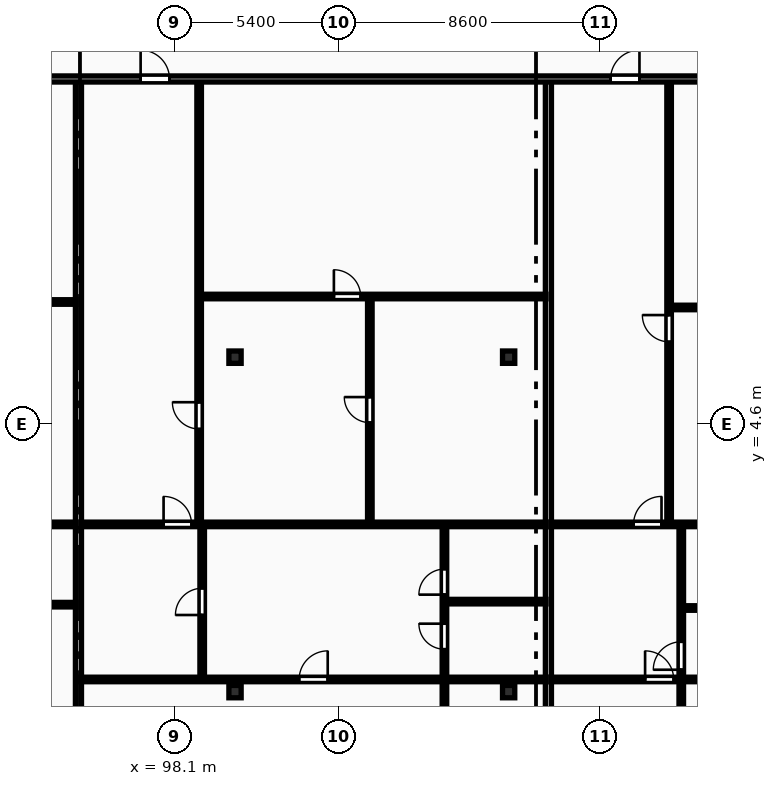
"""IFC4 building model, lengths in metres.
Left out: names, types, materials, properties, quantities, classifications, styles, units other than length and angle.
Written with IfcOpenShell. Run it as: python <this file> out.ifc"""

import sys

from ifc_helpers import new_model, si_unit, direction, frame, frame_2d, origin, origin_2d, place, context, subcontext, project, spatial, rectangle, i_section, extrude, element, fill, save


model = new_model("IFC4")
c1 = context("Model", 3, precision=1e-05, world=origin(), true_north=direction((0.0, 1.0)))
c2 = subcontext(c1, "Body", "Model", "MODEL_VIEW")
j1 = project(units=[si_unit("LENGTHUNIT", "METRE"), si_unit("PLANEANGLEUNIT", "RADIAN")], contexts=[c1])
p1 = place(None, origin())
s1 = spatial("IfcSite", under=j1, at=p1, CompositionType="ELEMENT")
p2 = place(p1, origin())
s2 = spatial("IfcBuilding", under=s1, at=p2, CompositionType="ELEMENT")
p3 = place(p2, frame((0.0, 0.0, 146.5)))
s3 = spatial("IfcBuildingStorey", under=s2, at=p3, CompositionType="ELEMENT", Elevation=146.5)
for number, where, z_axis, x_axis in (
    (1, (100.1, -4.2, 0.0), (0.0, 0.0, 1.0), (1.0, 0.0, 0.0)),
    (2, (100.1, 6.8, 0.0), (0.0, 0.0, 1.0), (1.0, 0.0, 0.0)),
    (3, (109.1, -4.2, 0.0), (0.0, 0.0, 1.0), (1.0, 0.0, 0.0)),
    (4, (109.1, 6.8, 0.0), (0.0, 0.0, 1.0), (1.0, 0.0, 0.0)),
):
    element("IfcColumn", number, at=place(p3, frame(where, z_axis=z_axis, x_axis=x_axis)), inside=s3, PredefinedType="COLUMN", context=c2, shape_type="SweptSolid", body=[
        extrude(i_section(OverallWidth=0.403, OverallDepth=0.406, WebThickness=0.027, FlangeThickness=0.043, FilletRadius=0.015, at=origin_2d()), origin(), (0.0, 0.0, 1.0), 3.6),
    ])
p4 = place(p3, frame((94.95, -8.7, 0.0), z_axis=(0.0, 0.0, 1.0), x_axis=(0.0, 1.0, 0.0)))
e5 = element("IfcWall", 5, at=p4, inside=s3, PredefinedType="PARTITIONING", context=c2, shape_type="SweptSolid", body=[
    extrude(rectangle(XDim=24.57, YDim=0.2, at=frame_2d((12.285, 0.0))), origin(), (0.0, 0.0, 1.0), 3.31),
])
p5 = place(p3, frame((76.73, 8.615, 0.0), z_axis=(0.0, 0.0, 1.0), x_axis=(1.0, 0.0, 0.0)))
e6 = element("IfcWall", 6, at=p5, inside=s3, PredefinedType="PARTITIONING", context=c2, shape_type="SweptSolid", body=[
    extrude(rectangle(XDim=18.14, YDim=0.15, at=frame_2d((9.07, 0.0))), origin(), (0.0, 0.0, 1.0), 3.31),
])
p6 = place(p5, frame((8.07, 0.0, 0.0)))
e7 = element("IfcOpeningElement", 7, at=p6, cuts=e6, PredefinedType="OPENING", context=c2, shape_type="SweptSolid", body=[
    extrude(rectangle(XDim=0.88, YDim=2.06, at=frame_2d((0.44, 1.03))), frame((0.0, 0.085, 0.0), z_axis=(0.0, -1.0, 0.0), x_axis=(1.0, 0.0, 0.0)), (0.0, 0.0, 1.0), 0.17),
])
p7 = place(p3, frame((77.53, -1.34, 0.0), z_axis=(0.0, 0.0, 1.0), x_axis=(1.0, 0.0, 0.0)))
e8 = element("IfcWall", 8, at=p7, inside=s3, PredefinedType="PARTITIONING", context=c2, shape_type="SweptSolid", body=[
    extrude(rectangle(XDim=17.34, YDim=0.15, at=frame_2d((8.67, 0.0))), origin(), (0.0, 0.0, 1.0), 3.31),
])
p8 = place(p7, frame((1.191, 0.0, 0.0)))
e9 = element("IfcOpeningElement", 9, at=p8, cuts=e8, PredefinedType="OPENING", context=c2, shape_type="SweptSolid", body=[
    extrude(rectangle(XDim=0.84, YDim=2.04, at=frame_2d((0.42, 1.02))), frame((0.0, 0.085, 0.0), z_axis=(0.0, -1.0, 0.0), x_axis=(1.0, 0.0, 0.0)), (0.0, 0.0, 1.0), 0.17),
])
p9 = place(p7, frame((8.25, 0.0, 0.0)))
e10 = element("IfcOpeningElement", 10, at=p9, cuts=e8, PredefinedType="OPENING", context=c2, shape_type="SweptSolid", body=[
    extrude(rectangle(XDim=0.84, YDim=2.04, at=frame_2d((0.42, 1.02))), frame((0.0, 0.085, 0.0), z_axis=(0.0, -1.0, 0.0), x_axis=(1.0, 0.0, 0.0)), (0.0, 0.0, 1.0), 0.17),
])
p10 = place(p7, frame((11.94, 0.0, 0.0)))
e11 = element("IfcOpeningElement", 11, at=p10, cuts=e8, PredefinedType="OPENING", context=c2, shape_type="SweptSolid", body=[
    extrude(rectangle(XDim=0.84, YDim=2.04, at=frame_2d((0.42, 1.02))), frame((0.0, 0.085, 0.0), z_axis=(0.0, -1.0, 0.0), x_axis=(1.0, 0.0, 0.0)), (0.0, 0.0, 1.0), 0.17),
])
p11 = place(p3, frame((72.78, 1.3, 0.0), z_axis=(0.0, 0.0, 1.0), x_axis=(1.0, 0.0, 0.0)))
e12 = element("IfcWall", 12, at=p11, inside=s3, PredefinedType="PARTITIONING", context=c2, shape_type="SweptSolid", body=[
    extrude(rectangle(XDim=22.09, YDim=0.15, at=frame_2d((11.045, 0.0))), origin(), (0.0, 0.0, 1.0), 3.31),
])
p12 = place(p11, frame((2.72, 0.0, 0.0)))
e13 = element("IfcOpeningElement", 13, at=p12, cuts=e12, PredefinedType="OPENING", context=c2, shape_type="SweptSolid", body=[
    extrude(rectangle(XDim=0.92, YDim=2.08, at=frame_2d((0.46, 1.04))), frame((0.0, 0.085, 0.0), z_axis=(0.0, -1.0, 0.0), x_axis=(1.0, 0.0, 0.0)), (0.0, 0.0, 1.0), 0.17),
])
p13 = place(p3, frame((110.408, -8.7, 0.0), z_axis=(0.0, 0.0, 1.0), x_axis=(0.0, 1.0, 0.0)))
e14 = element("IfcWall", 14, at=p13, inside=s3, PredefinedType="PARTITIONING", context=c2, shape_type="SweptSolid", body=[
    extrude(rectangle(XDim=24.57, YDim=0.2, at=frame_2d((12.285, 0.0))), origin(), (0.0, 0.0, 1.0), 3.31),
])
p14 = place(p3, frame((104.534, 1.34, 0.0), z_axis=(0.0, 0.0, 1.0), x_axis=(0.0, 1.0, 0.0)))
e15 = element("IfcWall", 15, at=p14, inside=s3, PredefinedType="PARTITIONING", context=c2, shape_type="SweptSolid", body=[
    extrude(rectangle(XDim=7.455, YDim=0.15, at=frame_2d((3.728, 0.0))), origin(), (0.0, 0.0, 1.0), 3.31),
])
p15 = place(p14, frame((3.308, 0.0, 0.0)))
e16 = element("IfcOpeningElement", 16, at=p15, cuts=e15, PredefinedType="OPENING", context=c2, shape_type="SweptSolid", body=[
    extrude(rectangle(XDim=0.84, YDim=2.04, at=frame_2d((0.42, 1.02))), frame((0.0, 0.085, 0.0), z_axis=(0.0, -1.0, 0.0), x_axis=(1.0, 0.0, 0.0)), (0.0, 0.0, 1.0), 0.17),
])
p16 = place(p3, frame((98.98, 8.795, 0.0), z_axis=(0.0, 0.0, 1.0), x_axis=(1.0, 0.0, 0.0)))
e17 = element("IfcWall", 17, at=p16, inside=s3, PredefinedType="PARTITIONING", context=c2, shape_type="SweptSolid", body=[
    extrude(rectangle(XDim=11.348, YDim=0.15, at=frame_2d((5.674, 0.0))), origin(), (0.0, 0.0, 1.0), 3.31),
])
p17 = place(p16, frame((4.372, 0.0, 0.0)))
e18 = element("IfcOpeningElement", 18, at=p17, cuts=e17, PredefinedType="OPENING", context=c2, shape_type="SweptSolid", body=[
    extrude(rectangle(XDim=0.88, YDim=2.06, at=frame_2d((0.44, 1.03))), frame((0.0, 0.085, 0.0), z_axis=(0.0, -1.0, 0.0), x_axis=(1.0, 0.0, 0.0)), (0.0, 0.0, 1.0), 0.17),
])
p18 = place(p3, frame((98.92, 1.34, 0.0), z_axis=(0.0, 0.0, 1.0), x_axis=(0.0, 1.0, 0.0)))
e19 = element("IfcWall", 19, at=p18, inside=s3, PredefinedType="PARTITIONING", context=c2, shape_type="SweptSolid", body=[
    extrude(rectangle(XDim=14.55, YDim=0.15, at=frame_2d((7.275, 0.0))), origin(), (0.0, 0.0, 1.0), 3.31),
])
p19 = place(p18, frame((3.098, 0.0, 0.0)))
e20 = element("IfcOpeningElement", 20, at=p19, cuts=e19, PredefinedType="OPENING", context=c2, shape_type="SweptSolid", body=[
    extrude(rectangle(XDim=0.88, YDim=2.06, at=frame_2d((0.44, 1.03))), frame((0.0, 0.085, 0.0), z_axis=(0.0, -1.0, 0.0), x_axis=(1.0, 0.0, 0.0)), (0.0, 0.0, 1.0), 0.17),
])
p20 = place(p3, frame((99.02, -3.74, 0.0), z_axis=(0.0, 0.0, 1.0), x_axis=(0.0, 1.0, 0.0)))
e21 = element("IfcWall", 21, at=p20, inside=s3, PredefinedType="PARTITIONING", context=c2, shape_type="SweptSolid", body=[
    extrude(rectangle(XDim=5.0, YDim=0.15, at=frame_2d((2.5, 0.0))), origin(), (0.0, 0.0, 1.0), 3.31),
])
p21 = place(p20, frame((2.06, 0.0, 0.0)))
e22 = element("IfcOpeningElement", 22, at=p21, cuts=e21, PredefinedType="OPENING", context=c2, shape_type="SweptSolid", body=[
    extrude(rectangle(XDim=0.88, YDim=2.06, at=frame_2d((0.44, 1.03))), frame((0.0, 0.085, 0.0), z_axis=(0.0, -1.0, 0.0), x_axis=(1.0, 0.0, 0.0)), (0.0, 0.0, 1.0), 0.17),
])
p22 = place(p3, frame((107.048, -1.24, 0.0), z_axis=(0.0, 0.0, 1.0), x_axis=(1.0, 0.0, 0.0)))
e23 = element("IfcWall", 23, at=p22, inside=s3, PredefinedType="PARTITIONING", context=c2, shape_type="SweptSolid", body=[
    extrude(rectangle(XDim=3.28, YDim=0.15, at=frame_2d((1.64, 0.0))), origin(), (0.0, 0.0, 1.0), 3.31),
])
p23 = place(p3, frame((106.988, -8.7, 0.0), z_axis=(0.0, 0.0, 1.0), x_axis=(0.0, 1.0, 0.0)))
e24 = element("IfcWall", 24, at=p23, inside=s3, PredefinedType="PARTITIONING", context=c2, shape_type="SweptSolid", body=[
    extrude(rectangle(XDim=9.96, YDim=0.15, at=frame_2d((4.98, 0.0))), origin(), (0.0, 0.0, 1.0), 3.31),
])
p24 = place(p23, frame((5.894, 0.0, 0.0)))
e25 = element("IfcOpeningElement", 25, at=p24, cuts=e24, PredefinedType="OPENING", context=c2, shape_type="SweptSolid", body=[
    extrude(rectangle(XDim=0.84, YDim=2.04, at=frame_2d((0.42, 1.02))), frame((0.0, 0.085, 0.0), z_axis=(0.0, -1.0, 0.0), x_axis=(1.0, 0.0, 0.0)), (0.0, 0.0, 1.0), 0.17),
])
p25 = place(p23, frame((7.69, 0.0, 0.0)))
e26 = element("IfcOpeningElement", 26, at=p25, cuts=e24, PredefinedType="OPENING", context=c2, shape_type="SweptSolid", body=[
    extrude(rectangle(XDim=0.84, YDim=2.04, at=frame_2d((0.42, 1.02))), frame((0.0, 0.085, 0.0), z_axis=(0.0, -1.0, 0.0), x_axis=(1.0, 0.0, 0.0)), (0.0, 0.0, 1.0), 0.17),
])
p26 = place(p23, frame((2.223, 0.0, 0.0)))
e27 = element("IfcOpeningElement", 27, at=p26, cuts=e24, PredefinedType="OPENING", context=c2, shape_type="SweptSolid", body=[
    extrude(rectangle(XDim=0.88, YDim=2.06, at=frame_2d((0.44, 1.03))), frame((0.0, 0.085, 0.0), z_axis=(0.0, -1.0, 0.0), x_axis=(1.0, 0.0, 0.0)), (0.0, 0.0, 1.0), 0.17),
])
p27 = place(p3, frame((95.03, 1.3, 0.0), z_axis=(0.0, 0.0, 1.0), x_axis=(1.0, 0.0, 0.0)))
e28 = element("IfcWall", 28, at=p27, inside=s3, PredefinedType="PARTITIONING", context=c2, shape_type="SweptSolid", body=[
    extrude(rectangle(XDim=15.298, YDim=0.15, at=frame_2d((7.649, 0.0))), origin(), (0.0, 0.0, 1.0), 3.31),
])
p28 = place(p27, frame((2.72, 0.0, 0.0)))
e29 = element("IfcOpeningElement", 29, at=p28, cuts=e28, PredefinedType="OPENING", context=c2, shape_type="SweptSolid", body=[
    extrude(rectangle(XDim=0.92, YDim=2.08, at=frame_2d((0.46, 1.04))), frame((0.0, 0.085, 0.0), z_axis=(0.0, -1.0, 0.0), x_axis=(1.0, 0.0, 0.0)), (0.0, 0.0, 1.0), 0.17),
])
p29 = place(p3, frame((95.03, -3.8, 0.0), z_axis=(0.0, 0.0, 1.0), x_axis=(1.0, 0.0, 0.0)))
e30 = element("IfcWall", 30, at=p29, inside=s3, PredefinedType="PARTITIONING", context=c2, shape_type="SweptSolid", body=[
    extrude(rectangle(XDim=15.298, YDim=0.15, at=frame_2d((7.649, 0.0))), origin(), (0.0, 0.0, 1.0), 3.31),
])
p30 = place(p29, frame((7.179, 0.0, 0.0)))
e31 = element("IfcOpeningElement", 31, at=p30, cuts=e30, PredefinedType="OPENING", context=c2, shape_type="SweptSolid", body=[
    extrude(rectangle(XDim=0.94, YDim=2.1, at=frame_2d((0.47, 1.05))), frame((0.0, 0.085, 0.0), z_axis=(0.0, -1.0, 0.0), x_axis=(1.0, 0.0, 0.0)), (0.0, 0.0, 1.0), 0.17),
])
p31 = place(p3, frame((114.438, 8.435, 0.0), z_axis=(0.0, 0.0, 1.0), x_axis=(1.0, 0.0, 0.0)))
e32 = element("IfcWall", 32, at=p31, inside=s3, PredefinedType="PARTITIONING", context=c2, shape_type="SweptSolid", body=[
    extrude(rectangle(XDim=16.182, YDim=0.15, at=frame_2d((8.091, 0.0))), origin(), (0.0, 0.0, 1.0), 3.31),
])
p32 = place(p31, frame((6.821, 0.0, 0.0)))
e33 = element("IfcOpeningElement", 33, at=p32, cuts=e32, PredefinedType="OPENING", context=c2, shape_type="SweptSolid", body=[
    extrude(rectangle(XDim=0.88, YDim=2.06, at=frame_2d((0.44, 1.03))), frame((0.0, 0.085, 0.0), z_axis=(0.0, -1.0, 0.0), x_axis=(1.0, 0.0, 0.0)), (0.0, 0.0, 1.0), 0.17),
])
p33 = place(p3, frame((114.378, 1.34, 0.0), z_axis=(0.0, 0.0, 1.0), x_axis=(0.0, 1.0, 0.0)))
e34 = element("IfcWall", 34, at=p33, inside=s3, PredefinedType="PARTITIONING", context=c2, shape_type="SweptSolid", body=[
    extrude(rectangle(XDim=14.55, YDim=0.15, at=frame_2d((7.275, 0.0))), origin(), (0.0, 0.0, 1.0), 3.31),
])
p34 = place(p33, frame((5.965, 0.0, 0.0)))
e35 = element("IfcOpeningElement", 35, at=p34, cuts=e34, PredefinedType="OPENING", context=c2, shape_type="SweptSolid", body=[
    extrude(rectangle(XDim=0.88, YDim=2.06, at=frame_2d((0.44, 1.03))), frame((0.0, 0.085, 0.0), z_axis=(0.0, -1.0, 0.0), x_axis=(1.0, 0.0, 0.0)), (0.0, 0.0, 1.0), 0.17),
])
p35 = place(p3, frame((114.778, -8.7, 0.0), z_axis=(0.0, 0.0, 1.0), x_axis=(0.0, 1.0, 0.0)))
e36 = element("IfcWall", 36, at=p35, inside=s3, PredefinedType="PARTITIONING", context=c2, shape_type="SweptSolid", body=[
    extrude(rectangle(XDim=9.96, YDim=0.15, at=frame_2d((4.98, 0.0))), origin(), (0.0, 0.0, 1.0), 3.31),
])
p36 = place(p35, frame((5.22, 0.0, 0.0)))
e37 = element("IfcOpeningElement", 37, at=p36, cuts=e36, PredefinedType="OPENING", context=c2, shape_type="SweptSolid", body=[
    extrude(rectangle(XDim=0.92, YDim=2.08, at=frame_2d((0.46, 1.04))), frame((0.0, 0.085, 0.0), z_axis=(0.0, -1.0, 0.0), x_axis=(1.0, 0.0, 0.0)), (0.0, 0.0, 1.0), 0.17),
])
p37 = place(p3, frame((114.818, -1.45, 0.0), z_axis=(0.0, 0.0, 1.0), x_axis=(1.0, 0.0, 0.0)))
e38 = element("IfcWall", 38, at=p37, inside=s3, PredefinedType="PARTITIONING", context=c2, shape_type="SweptSolid", body=[
    extrude(rectangle(XDim=15.802, YDim=0.15, at=frame_2d((7.901, 0.0))), origin(), (0.0, 0.0, 1.0), 3.31),
])
p38 = place(p37, frame((1.21, 0.0, 0.0)))
e39 = element("IfcOpeningElement", 39, at=p38, cuts=e38, PredefinedType="OPENING", context=c2, shape_type="SweptSolid", body=[
    extrude(rectangle(XDim=0.84, YDim=2.04, at=frame_2d((0.42, 1.02))), frame((0.0, 0.085, 0.0), z_axis=(0.0, -1.0, 0.0), x_axis=(1.0, 0.0, 0.0)), (0.0, 0.0, 1.0), 0.17),
])
p39 = place(p37, frame((7.481, 0.0, 0.0)))
e40 = element("IfcOpeningElement", 40, at=p39, cuts=e38, PredefinedType="OPENING", context=c2, shape_type="SweptSolid", body=[
    extrude(rectangle(XDim=0.84, YDim=2.04, at=frame_2d((0.42, 1.02))), frame((0.0, 0.085, 0.0), z_axis=(0.0, -1.0, 0.0), x_axis=(1.0, 0.0, 0.0)), (0.0, 0.0, 1.0), 0.17),
])
p40 = place(p37, frame((11.362, 0.0, 0.0)))
e41 = element("IfcOpeningElement", 41, at=p40, cuts=e38, PredefinedType="OPENING", context=c2, shape_type="SweptSolid", body=[
    extrude(rectangle(XDim=0.84, YDim=2.04, at=frame_2d((0.42, 1.02))), frame((0.0, 0.085, 0.0), z_axis=(0.0, -1.0, 0.0), x_axis=(1.0, 0.0, 0.0)), (0.0, 0.0, 1.0), 0.17),
])
p41 = place(p3, frame((110.488, 1.3, 0.0), z_axis=(0.0, 0.0, 1.0), x_axis=(1.0, 0.0, 0.0)))
e42 = element("IfcWall", 42, at=p41, inside=s3, PredefinedType="PARTITIONING", context=c2, shape_type="SweptSolid", body=[
    extrude(rectangle(XDim=20.132, YDim=0.15, at=frame_2d((10.066, 0.0))), origin(), (0.0, 0.0, 1.0), 3.31),
])
p42 = place(p41, frame((2.72, 0.0, 0.0)))
e43 = element("IfcOpeningElement", 43, at=p42, cuts=e42, PredefinedType="OPENING", context=c2, shape_type="SweptSolid", body=[
    extrude(rectangle(XDim=0.92, YDim=2.08, at=frame_2d((0.46, 1.04))), frame((0.0, 0.085, 0.0), z_axis=(0.0, -1.0, 0.0), x_axis=(1.0, 0.0, 0.0)), (0.0, 0.0, 1.0), 0.17),
])
p43 = place(p3, frame((110.488, -3.8, 0.0), z_axis=(0.0, 0.0, 1.0), x_axis=(1.0, 0.0, 0.0)))
e44 = element("IfcWall", 44, at=p43, inside=s3, PredefinedType="PARTITIONING", context=c2, shape_type="SweptSolid", body=[
    extrude(rectangle(XDim=15.442, YDim=0.15, at=frame_2d((7.721, 0.0))), origin(), (0.0, 0.0, 1.0), 3.31),
])
p44 = place(p43, frame((3.1, 0.0, 0.0)))
e45 = element("IfcOpeningElement", 45, at=p44, cuts=e44, PredefinedType="OPENING", context=c2, shape_type="SweptSolid", body=[
    extrude(rectangle(XDim=0.94, YDim=2.1, at=frame_2d((0.47, 1.05))), frame((0.0, 0.085, 0.0), z_axis=(0.0, -1.0, 0.0), x_axis=(1.0, 0.0, 0.0)), (0.0, 0.0, 1.0), 0.17),
])
p45 = place(p43, frame((5.311, 0.0, 0.0)))
e46 = element("IfcOpeningElement", 46, at=p45, cuts=e44, PredefinedType="OPENING", context=c2, shape_type="SweptSolid", body=[
    extrude(rectangle(XDim=0.88, YDim=2.06, at=frame_2d((0.44, 1.03))), frame((0.0, 0.085, 0.0), z_axis=(0.0, -1.0, 0.0), x_axis=(1.0, 0.0, 0.0)), (0.0, 0.0, 1.0), 0.17),
])
p46 = place(p43, frame((9.926, 0.0, 0.0)))
e47 = element("IfcOpeningElement", 47, at=p46, cuts=e44, PredefinedType="OPENING", context=c2, shape_type="SweptSolid", body=[
    extrude(rectangle(XDim=0.88, YDim=2.06, at=frame_2d((0.44, 1.03))), frame((0.0, 0.085, 0.0), z_axis=(0.0, -1.0, 0.0), x_axis=(1.0, 0.0, 0.0)), (0.0, 0.0, 1.0), 0.17),
])
p47 = place(p3, frame((72.7, 15.95, 0.0), z_axis=(0.0, 0.0, 1.0), x_axis=(1.0, 0.0, 0.0)))
e48 = element("IfcWall", 48, at=p47, inside=s3, PredefinedType="PARTITIONING", context=c2, shape_type="SweptSolid", body=[
    extrude(rectangle(XDim=58.0, YDim=0.2, at=frame_2d((29.0, 0.0))), origin(), (0.0, 0.0, 1.0), 3.31),
])
p48 = place(p47, frame((2.045, 0.0, 0.0)))
e49 = element("IfcOpeningElement", 49, at=p48, cuts=e48, PredefinedType="OPENING", context=c2, shape_type="SweptSolid", body=[
    extrude(rectangle(XDim=0.95, YDim=2.15, at=frame_2d((0.475, 1.075))), frame((0.0, 0.11, 0.0), z_axis=(0.0, -1.0, 0.0), x_axis=(1.0, 0.0, 0.0)), (0.0, 0.0, 1.0), 0.22),
])
p49 = place(p47, frame((24.295, 0.0, 0.0)))
e50 = element("IfcOpeningElement", 50, at=p49, cuts=e48, PredefinedType="OPENING", context=c2, shape_type="SweptSolid", body=[
    extrude(rectangle(XDim=0.95, YDim=2.15, at=frame_2d((0.475, 1.075))), frame((0.0, 0.11, 0.0), z_axis=(0.0, -1.0, 0.0), x_axis=(1.0, 0.0, 0.0)), (0.0, 0.0, 1.0), 0.22),
])
p50 = place(p47, frame((39.753, 0.0, 0.0)))
e51 = element("IfcOpeningElement", 51, at=p50, cuts=e48, PredefinedType="OPENING", context=c2, shape_type="SweptSolid", body=[
    extrude(rectangle(XDim=0.95, YDim=2.15, at=frame_2d((0.475, 1.075))), frame((0.0, 0.11, 0.0), z_axis=(0.0, -1.0, 0.0), x_axis=(1.0, 0.0, 0.0)), (0.0, 0.0, 1.0), 0.22),
])
p51 = place(p15, origin())
e52 = element("IfcDoor", 52, at=p51, inside=s3, OperationType="SINGLE_SWING_RIGHT", PredefinedType="DOOR", context=c2, shape_type="SweptSolid", body=[
    extrude(rectangle(XDim=0.84, YDim=2.04, at=frame_2d((0.42, 1.02))), frame((0.0, 0.025, 0.0), z_axis=(0.0, -1.0, 0.0), x_axis=(1.0, 0.0, 0.0)), (0.0, 0.0, 1.0), 0.05),
])
fill(e16, e52)
p52 = place(p17, origin())
e53 = element("IfcDoor", 53, at=p52, inside=s3, OperationType="SINGLE_SWING_LEFT", PredefinedType="DOOR", context=c2, shape_type="SweptSolid", body=[
    extrude(rectangle(XDim=0.88, YDim=2.06, at=frame_2d((0.44, 1.03))), frame((0.0, 0.025, 0.0), z_axis=(0.0, -1.0, 0.0), x_axis=(1.0, 0.0, 0.0)), (0.0, 0.0, 1.0), 0.05),
])
fill(e18, e53)
p53 = place(p19, origin())
e54 = element("IfcDoor", 54, at=p53, inside=s3, OperationType="SINGLE_SWING_RIGHT", PredefinedType="DOOR", context=c2, shape_type="SweptSolid", body=[
    extrude(rectangle(XDim=0.88, YDim=2.06, at=frame_2d((0.44, 1.03))), frame((0.0, 0.025, 0.0), z_axis=(0.0, -1.0, 0.0), x_axis=(1.0, 0.0, 0.0)), (0.0, 0.0, 1.0), 0.05),
])
fill(e20, e54)
p54 = place(p21, origin())
e55 = element("IfcDoor", 55, at=p54, inside=s3, OperationType="SINGLE_SWING_LEFT", PredefinedType="DOOR", context=c2, shape_type="SweptSolid", body=[
    extrude(rectangle(XDim=0.88, YDim=2.06, at=frame_2d((0.44, 1.03))), frame((0.0, 0.025, 0.0), z_axis=(0.0, -1.0, 0.0), x_axis=(1.0, 0.0, 0.0)), (0.0, 0.0, 1.0), 0.05),
])
fill(e22, e55)
p55 = place(p24, origin())
e56 = element("IfcDoor", 56, at=p55, inside=s3, OperationType="SINGLE_SWING_RIGHT", PredefinedType="DOOR", context=c2, shape_type="SweptSolid", body=[
    extrude(rectangle(XDim=0.84, YDim=2.04, at=frame_2d((0.42, 1.02))), frame((0.0, 0.025, 0.0), z_axis=(0.0, -1.0, 0.0), x_axis=(1.0, 0.0, 0.0)), (0.0, 0.0, 1.0), 0.05),
])
fill(e25, e56)
p56 = place(p25, origin())
e57 = element("IfcDoor", 57, at=p56, inside=s3, OperationType="SINGLE_SWING_LEFT", PredefinedType="DOOR", context=c2, shape_type="SweptSolid", body=[
    extrude(rectangle(XDim=0.84, YDim=2.04, at=frame_2d((0.42, 1.02))), frame((0.0, 0.025, 0.0), z_axis=(0.0, -1.0, 0.0), x_axis=(1.0, 0.0, 0.0)), (0.0, 0.0, 1.0), 0.05),
])
fill(e26, e57)
p57 = place(p28, origin())
e58 = element("IfcDoor", 58, at=p57, inside=s3, OperationType="SINGLE_SWING_LEFT", PredefinedType="DOOR", context=c2, shape_type="SweptSolid", body=[
    extrude(rectangle(XDim=0.92, YDim=2.08, at=frame_2d((0.46, 1.04))), frame((0.0, 0.025, 0.0), z_axis=(0.0, -1.0, 0.0), x_axis=(1.0, 0.0, 0.0)), (0.0, 0.0, 1.0), 0.05),
])
fill(e29, e58)
p58 = place(p30, origin())
e59 = element("IfcDoor", 59, at=p58, inside=s3, OperationType="SINGLE_SWING_RIGHT", PredefinedType="DOOR", context=c2, shape_type="SweptSolid", body=[
    extrude(rectangle(XDim=0.94, YDim=2.1, at=frame_2d((0.47, 1.05))), frame((0.0, 0.025, 0.0), z_axis=(0.0, -1.0, 0.0), x_axis=(1.0, 0.0, 0.0)), (0.0, 0.0, 1.0), 0.05),
])
fill(e31, e59)
p59 = place(p34, origin())
e60 = element("IfcDoor", 60, at=p59, inside=s3, OperationType="SINGLE_SWING_RIGHT", PredefinedType="DOOR", context=c2, shape_type="SweptSolid", body=[
    extrude(rectangle(XDim=0.88, YDim=2.06, at=frame_2d((0.44, 1.03))), frame((0.0, 0.025, 0.0), z_axis=(0.0, -1.0, 0.0), x_axis=(1.0, 0.0, 0.0)), (0.0, 0.0, 1.0), 0.05),
])
fill(e35, e60)
p60 = place(p36, origin())
e61 = element("IfcDoor", 61, at=p60, inside=s3, OperationType="SINGLE_SWING_LEFT", PredefinedType="DOOR", context=c2, shape_type="SweptSolid", body=[
    extrude(rectangle(XDim=0.92, YDim=2.08, at=frame_2d((0.46, 1.04))), frame((0.0, 0.025, 0.0), z_axis=(0.0, -1.0, 0.0), x_axis=(1.0, 0.0, 0.0)), (0.0, 0.0, 1.0), 0.05),
])
fill(e37, e61)
p61 = place(p42, origin())
e62 = element("IfcDoor", 62, at=p61, inside=s3, OperationType="SINGLE_SWING_RIGHT", PredefinedType="DOOR", context=c2, shape_type="SweptSolid", body=[
    extrude(rectangle(XDim=0.92, YDim=2.08, at=frame_2d((0.46, 1.04))), frame((0.0, 0.025, 0.0), z_axis=(0.0, -1.0, 0.0), x_axis=(1.0, 0.0, 0.0)), (0.0, 0.0, 1.0), 0.05),
])
fill(e43, e62)
p62 = place(p44, origin())
e63 = element("IfcDoor", 63, at=p62, inside=s3, OperationType="SINGLE_SWING_LEFT", PredefinedType="DOOR", context=c2, shape_type="SweptSolid", body=[
    extrude(rectangle(XDim=0.94, YDim=2.1, at=frame_2d((0.47, 1.05))), frame((0.0, 0.025, 0.0), z_axis=(0.0, -1.0, 0.0), x_axis=(1.0, 0.0, 0.0)), (0.0, 0.0, 1.0), 0.05),
])
fill(e45, e63)
p63 = place(p49, origin())
e64 = element("IfcDoor", 64, at=p63, inside=s3, OperationType="SINGLE_SWING_LEFT", PredefinedType="DOOR", context=c2, shape_type="SweptSolid", body=[
    extrude(rectangle(XDim=0.95, YDim=2.15, at=frame_2d((0.475, 1.075))), frame((0.0, 0.025, 0.0), z_axis=(0.0, -1.0, 0.0), x_axis=(1.0, 0.0, 0.0)), (0.0, 0.0, 1.0), 0.05),
])
fill(e50, e64)
p64 = place(p50, origin())
e65 = element("IfcDoor", 65, at=p64, inside=s3, OperationType="SINGLE_SWING_RIGHT", PredefinedType="DOOR", context=c2, shape_type="SweptSolid", body=[
    extrude(rectangle(XDim=0.95, YDim=2.15, at=frame_2d((0.475, 1.075))), frame((0.0, 0.025, 0.0), z_axis=(0.0, -1.0, 0.0), x_axis=(1.0, 0.0, 0.0)), (0.0, 0.0, 1.0), 0.05),
])
fill(e51, e65)
save(model, sys.argv[1])
